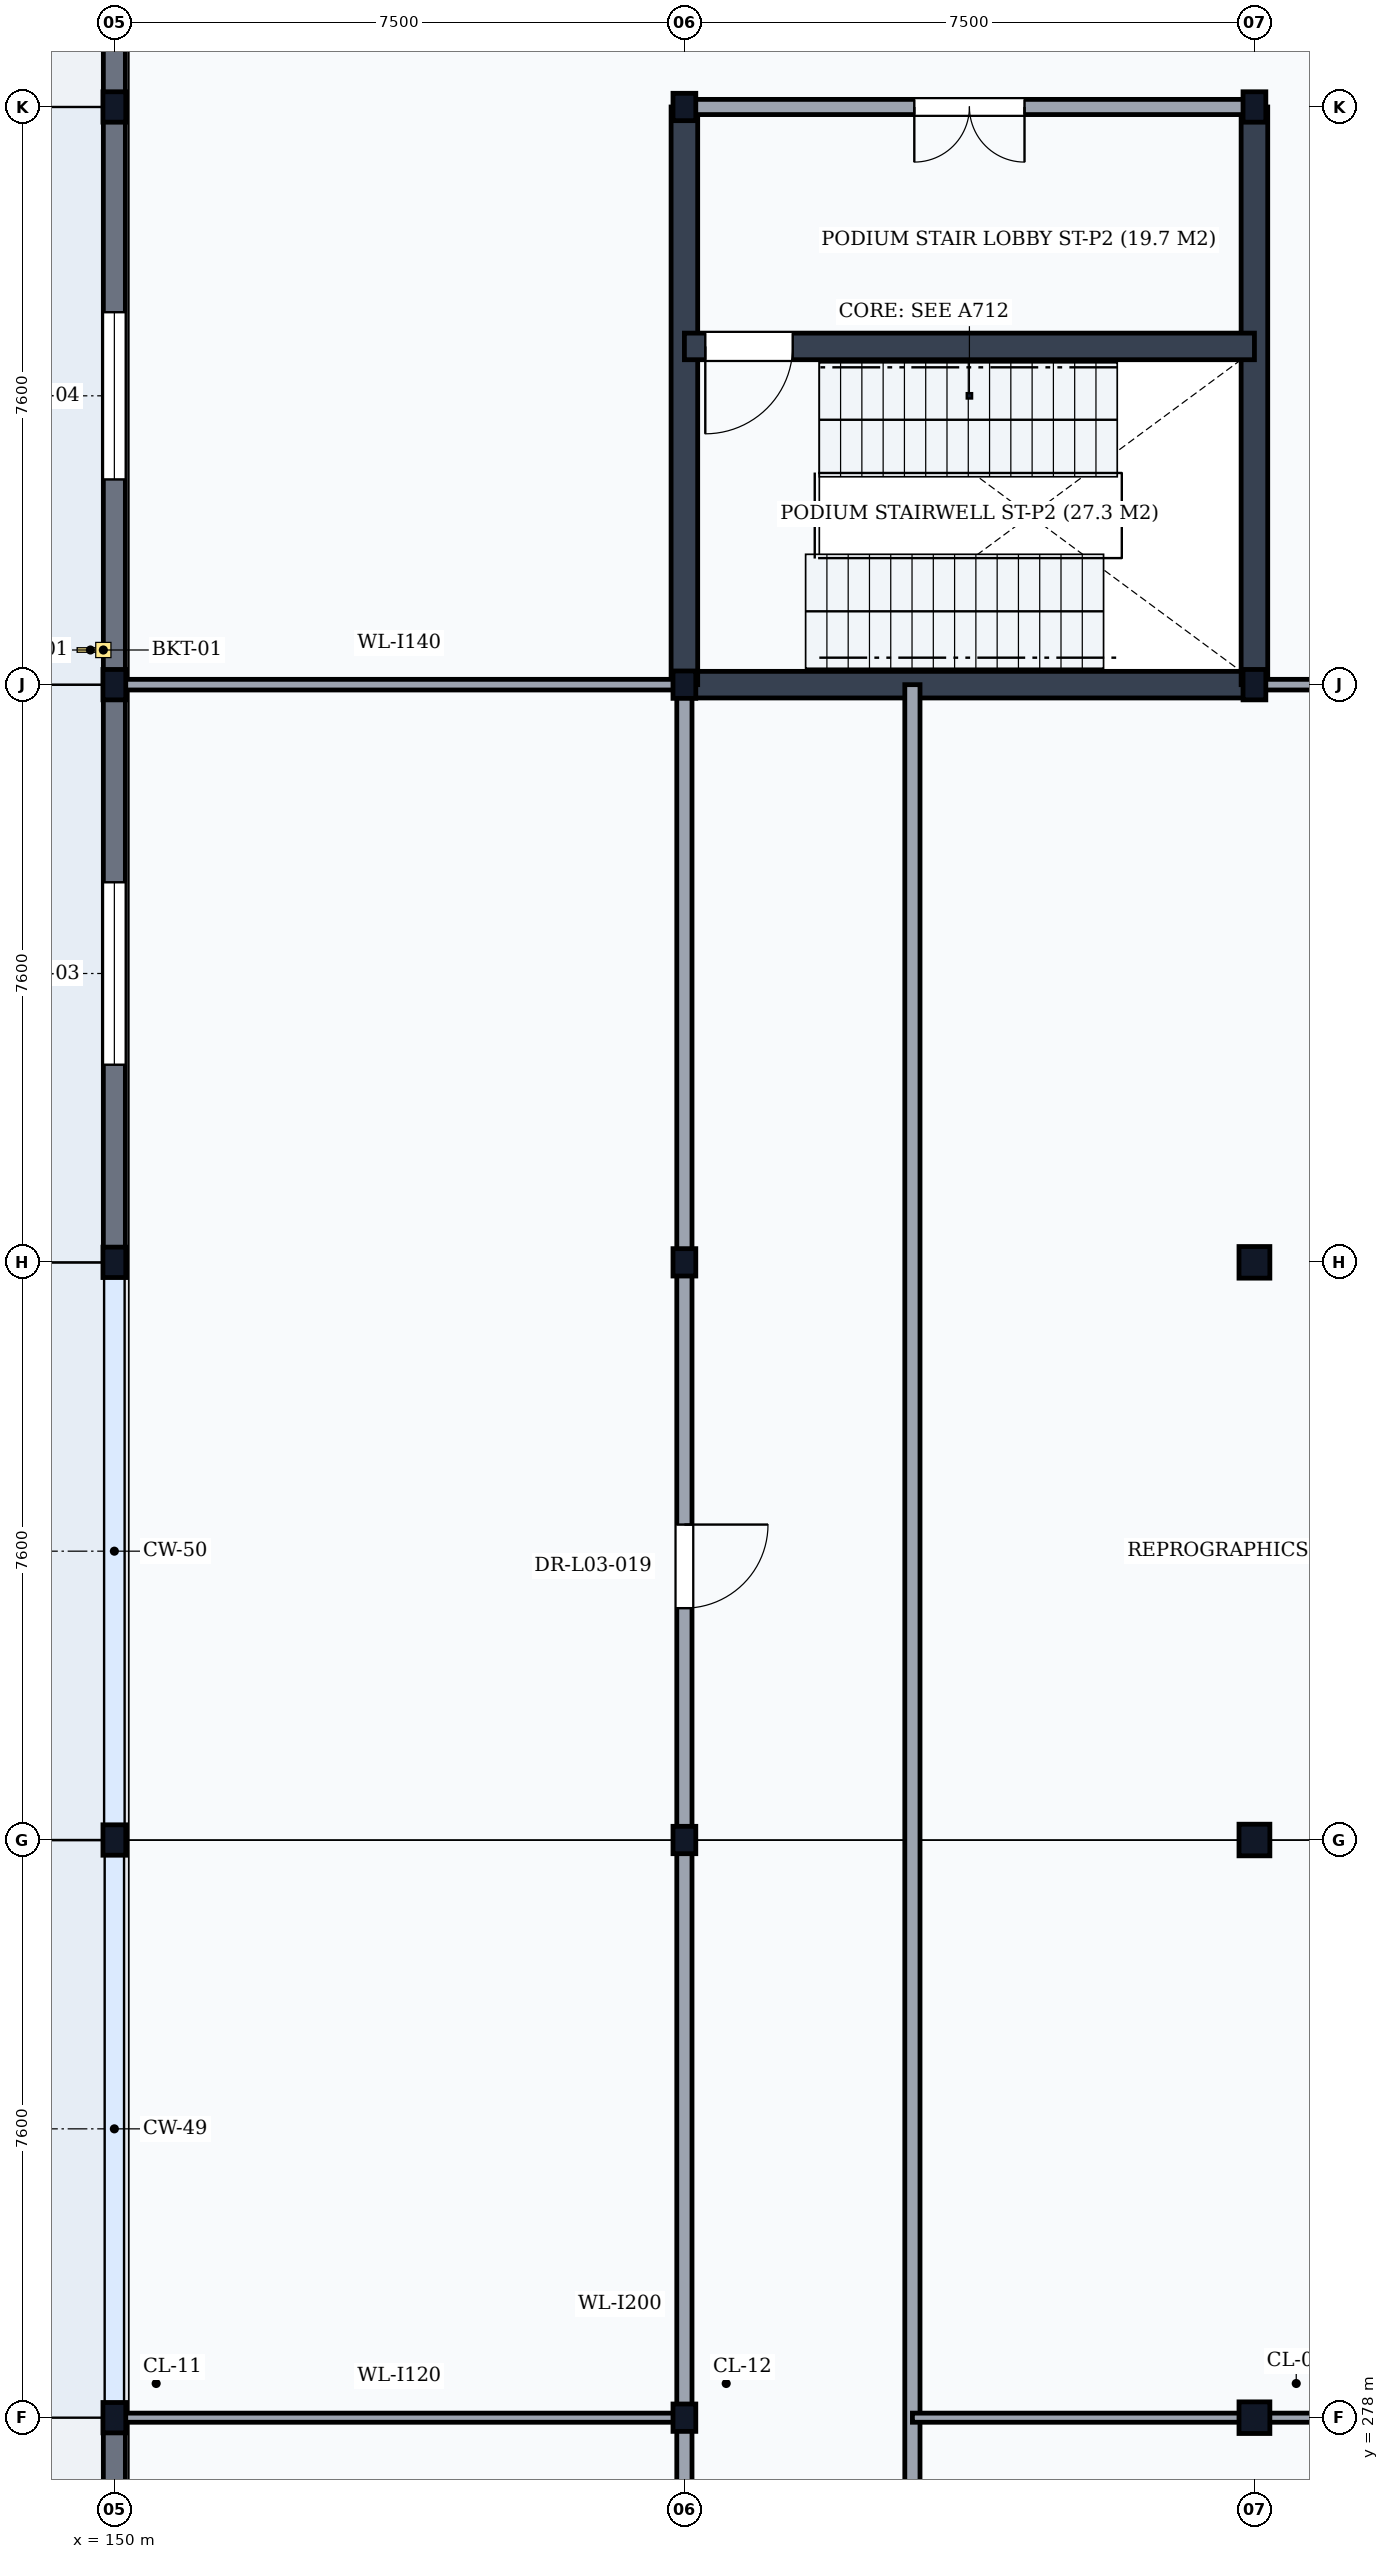
"""IFC4 building model, lengths in metres.
Left out: names, types, materials, properties, quantities, classifications, styles, units other than length and angle.
Written with IfcOpenShell. Run it as: python <this file> out.ifc"""

import sys

from ifc_helpers import new_model, si_unit, direction, frame, frame_2d, origin, origin_2d, place, context, subcontext, project, spatial, rectangle, i_section, extrude, element, fill, save


model = new_model("IFC4")
c1 = context("Model", 3, precision=1e-05, world=origin(), true_north=direction((0.0, 1.0)))
c2 = subcontext(c1, "Body", "Model", "MODEL_VIEW")
j1 = project(units=[si_unit("LENGTHUNIT", "METRE"), si_unit("PLANEANGLEUNIT", "RADIAN")], contexts=[c1])
p1 = place(None, origin())
s1 = spatial("IfcSite", under=j1, at=p1, CompositionType="ELEMENT")
p2 = place(p1, origin())
s2 = spatial("IfcBuilding", under=s1, at=p2, CompositionType="ELEMENT")
p3 = place(p2, frame((0.0, 0.0, 10.5)))
s3 = spatial("IfcBuildingStorey", under=s2, at=p3, CompositionType="ELEMENT", Elevation=10.5)
for number, where, z_axis, x_axis in (
    (1, (150.0, 278.0, 0.0), (0.0, 0.0, 1.0), (1.0, 0.0, 0.0)),
    (2, (150.0, 285.6, 0.0), (0.0, 0.0, 1.0), (1.0, 0.0, 0.0)),
    (3, (150.0, 293.2, 0.0), (0.0, 0.0, 1.0), (1.0, 0.0, 0.0)),
    (4, (150.0, 300.8, 0.0), (0.0, 0.0, 1.0), (1.0, 0.0, 0.0)),
    (5, (150.0, 308.4, 0.0), (0.0, 0.0, 1.0), (1.0, 0.0, 0.0)),
):
    element("IfcColumn", number, at=place(p3, frame(where, z_axis=z_axis, x_axis=x_axis)), inside=s3, PredefinedType="COLUMN", context=c2, shape_type="SweptSolid", body=[
        extrude(i_section(OverallWidth=0.3, OverallDepth=0.4, WebThickness=0.013, FlangeThickness=0.024, FilletRadius=0.027, at=origin_2d()), origin(), (0.0, 0.0, 1.0), 5.1),
    ])
for number, where, z_axis, x_axis in (
    (6, (157.5, 278.0, 0.0), (0.0, 0.0, 1.0), (1.0, 0.0, 0.0)),
    (7, (157.5, 285.6, 0.0), (0.0, 0.0, 1.0), (1.0, 0.0, 0.0)),
    (8, (157.5, 293.2, 0.0), (0.0, 0.0, 1.0), (1.0, 0.0, 0.0)),
    (9, (157.5, 300.8, 0.0), (0.0, 0.0, 1.0), (1.0, 0.0, 0.0)),
    (10, (157.5, 308.4, 0.0), (0.0, 0.0, 1.0), (1.0, 0.0, 0.0)),
):
    element("IfcColumn", number, at=place(p3, frame(where, z_axis=z_axis, x_axis=x_axis)), inside=s3, PredefinedType="COLUMN", context=c2, shape_type="SweptSolid", body=[
        extrude(i_section(OverallWidth=0.3, OverallDepth=0.36, WebThickness=0.012, FlangeThickness=0.022, FilletRadius=0.027, at=origin_2d()), origin(), (0.0, 0.0, 1.0), 5.1),
    ])
for number, where, z_axis, x_axis in (
    (11, (165.0, 278.0, 0.0), (0.0, 0.0, 1.0), (1.0, 0.0, 0.0)),
    (12, (165.0, 285.6, 0.0), (0.0, 0.0, 1.0), (1.0, 0.0, 0.0)),
    (13, (165.0, 293.2, 0.0), (0.0, 0.0, 1.0), (1.0, 0.0, 0.0)),
):
    element("IfcColumn", number, at=place(p3, frame(where, z_axis=z_axis, x_axis=x_axis)), inside=s3, PredefinedType="COLUMN", context=c2, shape_type="SweptSolid", body=[
        extrude(i_section(OverallWidth=0.406, OverallDepth=0.416, WebThickness=0.03, FlangeThickness=0.048, FilletRadius=0.015, at=origin_2d()), origin(), (0.0, 0.0, 1.0), 5.1),
    ])
for number, where, z_axis, x_axis in (
    (14, (165.0, 300.8, 0.0), (0.0, 0.0, 1.0), (1.0, 0.0, 0.0)),
    (15, (165.0, 308.4, 0.0), (0.0, 0.0, 1.0), (1.0, 0.0, 0.0)),
):
    element("IfcColumn", number, at=place(p3, frame(where, z_axis=z_axis, x_axis=x_axis)), inside=s3, PredefinedType="COLUMN", context=c2, shape_type="SweptSolid", body=[
        extrude(i_section(OverallWidth=0.3, OverallDepth=0.4, WebThickness=0.013, FlangeThickness=0.024, FilletRadius=0.027, at=origin_2d()), origin(), (0.0, 0.0, 1.0), 5.1),
    ])
p4 = place(p3, frame((150.0, 270.406, 0.0), z_axis=(0.0, 0.0, 1.0), x_axis=(0.0, 1.0, 0.0)))
e16 = element("IfcWall", 16, at=p4, inside=s3, PredefinedType="SOLIDWALL", context=c2, shape_type="SweptSolid", body=[
    extrude(rectangle(XDim=7.588, YDim=0.29, at=frame_2d((3.794, 0.0))), origin(), (0.0, 0.0, 1.0), 4.578),
])
p5 = place(p4, frame((3.094, 0.0, 0.95)))
e17 = element("IfcOpeningElement", 17, at=p5, cuts=e16, PredefinedType="OPENING", context=c2, shape_type="SweptSolid", body=[
    extrude(rectangle(XDim=1.4, YDim=2.4, at=frame_2d((0.7, 1.2))), frame((0.0, 0.16, 0.0), z_axis=(0.0, -1.0, 0.0), x_axis=(1.0, 0.0, 0.0)), (0.0, 0.0, 1.0), 0.32),
])
p6 = place(p3, frame((150.0, 293.206, 0.0), z_axis=(0.0, 0.0, 1.0), x_axis=(0.0, 1.0, 0.0)))
e18 = element("IfcWall", 18, at=p6, inside=s3, PredefinedType="SOLIDWALL", context=c2, shape_type="SweptSolid", body=[
    extrude(rectangle(XDim=7.588, YDim=0.29, at=frame_2d((3.794, 0.0))), origin(), (0.0, 0.0, 1.0), 4.578),
])
p7 = place(p6, frame((2.594, 0.0, 0.95)))
e19 = element("IfcOpeningElement", 19, at=p7, cuts=e18, PredefinedType="OPENING", context=c2, shape_type="SweptSolid", body=[
    extrude(rectangle(XDim=2.4, YDim=2.8, at=frame_2d((1.2, 1.4))), frame((0.0, 0.16, 0.0), z_axis=(0.0, -1.0, 0.0), x_axis=(1.0, 0.0, 0.0)), (0.0, 0.0, 1.0), 0.32),
])
p8 = place(p3, frame((150.0, 300.806, 0.0), z_axis=(0.0, 0.0, 1.0), x_axis=(0.0, 1.0, 0.0)))
e20 = element("IfcWall", 20, at=p8, inside=s3, PredefinedType="SOLIDWALL", context=c2, shape_type="SweptSolid", body=[
    extrude(rectangle(XDim=7.588, YDim=0.29, at=frame_2d((3.794, 0.0))), origin(), (0.0, 0.0, 1.0), 4.578),
])
p9 = place(p8, frame((2.694, 0.0, 0.95)))
e21 = element("IfcOpeningElement", 21, at=p9, cuts=e20, PredefinedType="OPENING", context=c2, shape_type="SweptSolid", body=[
    extrude(rectangle(XDim=2.2, YDim=2.8, at=frame_2d((1.1, 1.4))), frame((0.0, 0.16, 0.0), z_axis=(0.0, -1.0, 0.0), x_axis=(1.0, 0.0, 0.0)), (0.0, 0.0, 1.0), 0.32),
])
p10 = place(p3, frame((150.0, 308.406, 0.0), z_axis=(0.0, 0.0, 1.0), x_axis=(0.0, 1.0, 0.0)))
e22 = element("IfcWall", 22, at=p10, inside=s3, PredefinedType="SOLIDWALL", context=c2, shape_type="SweptSolid", body=[
    extrude(rectangle(XDim=7.588, YDim=0.29, at=frame_2d((3.794, 0.0))), origin(), (0.0, 0.0, 1.0), 4.578),
])
p11 = place(p10, frame((2.794, 0.0, 0.95)))
e23 = element("IfcOpeningElement", 23, at=p11, cuts=e22, PredefinedType="OPENING", context=c2, shape_type="SweptSolid", body=[
    extrude(rectangle(XDim=2.0, YDim=2.6, at=frame_2d((1.0, 1.3))), frame((0.0, 0.16, 0.0), z_axis=(0.0, -1.0, 0.0), x_axis=(1.0, 0.0, 0.0)), (0.0, 0.0, 1.0), 0.32),
])
p12 = place(p3, frame((150.1, 248.6, 5.1), z_axis=(0.0, 0.0, 1.0), x_axis=(0.0, 1.0, 0.0)))
e24 = element("IfcWall", 24, at=p12, inside=s3, PredefinedType="PARAPET", context=c2, shape_type="SweptSolid", body=[
    extrude(rectangle(XDim=74.8, YDim=0.18, at=frame_2d((37.4, 0.0))), origin(), (0.0, 0.0, 1.0), 1.2),
])
p13 = place(p3, frame((157.5, 300.8, 0.0), z_axis=(0.0, 0.0, 1.0), x_axis=(1.0, 0.0, 0.0)))
e25 = element("IfcWall", 25, at=p13, inside=s3, PredefinedType="SHEAR", context=c2, shape_type="SweptSolid", body=[
    extrude(rectangle(XDim=7.5, YDim=0.35, at=frame_2d((3.75, 0.0))), origin(), (0.0, 0.0, 1.0), 4.84),
])
for number, where, z_axis, x_axis in (
    (26, (157.5, 300.8, 0.0), (0.0, 0.0, 1.0), (0.0, 1.0, 0.0)),
    (27, (165.0, 300.8, 0.0), (0.0, 0.0, 1.0), (0.0, 1.0, 0.0)),
):
    element("IfcWall", number, at=place(p3, frame(where, z_axis=z_axis, x_axis=x_axis)), inside=s3, PredefinedType="SHEAR", context=c2, shape_type="SweptSolid", body=[
        extrude(rectangle(XDim=7.6, YDim=0.35, at=frame_2d((3.8, 0.0))), origin(), (0.0, 0.0, 1.0), 4.84),
    ])
p14 = place(p3, frame((157.5, 305.25, 0.0), z_axis=(0.0, 0.0, 1.0), x_axis=(1.0, 0.0, 0.0)))
e28 = element("IfcWall", 28, at=p14, inside=s3, PredefinedType="SHEAR", context=c2, shape_type="SweptSolid", body=[
    extrude(rectangle(XDim=7.5, YDim=0.35, at=frame_2d((3.75, 0.0))), origin(), (0.0, 0.0, 1.0), 4.84),
])
p15 = place(p14, frame((0.275, 0.0, 0.0)))
e29 = element("IfcOpeningElement", 29, at=p15, cuts=e28, PredefinedType="OPENING", context=c2, shape_type="SweptSolid", body=[
    extrude(rectangle(XDim=1.15, YDim=2.15, at=frame_2d((0.575, 1.075))), frame((0.0, 0.19, 0.0), z_axis=(0.0, -1.0, 0.0), x_axis=(1.0, 0.0, 0.0)), (0.0, 0.0, 1.0), 0.38),
])
p16 = place(p3, frame((157.5, 308.4, 0.0), z_axis=(0.0, 0.0, 1.0), x_axis=(1.0, 0.0, 0.0)))
e30 = element("IfcWall", 30, at=p16, inside=s3, PredefinedType="PARTITIONING", context=c2, shape_type="SweptSolid", body=[
    extrude(rectangle(XDim=7.5, YDim=0.2, at=frame_2d((3.75, 0.0))), origin(), (0.0, 0.0, 1.0), 4.478),
])
p17 = place(p16, frame((3.025, 0.0, 0.0)))
e31 = element("IfcOpeningElement", 31, at=p17, cuts=e30, PredefinedType="OPENING", context=c2, shape_type="SweptSolid", body=[
    extrude(rectangle(XDim=1.45, YDim=2.2, at=frame_2d((0.725, 1.1))), frame((0.0, 0.115, 0.0), z_axis=(0.0, -1.0, 0.0), x_axis=(1.0, 0.0, 0.0)), (0.0, 0.0, 1.0), 0.23),
])
p18 = place(p3, frame((157.5, 258.2, 0.0), z_axis=(0.0, 0.0, 1.0), x_axis=(0.0, 1.0, 0.0)))
e32 = element("IfcWall", 32, at=p18, inside=s3, PredefinedType="PARTITIONING", context=c2, shape_type="SweptSolid", body=[
    extrude(rectangle(XDim=42.6, YDim=0.2, at=frame_2d((21.3, 0.0))), origin(), (0.0, 0.0, 1.0), 4.478),
])
p19 = place(p18, frame((30.45, 0.0, 0.0)))
e33 = element("IfcOpeningElement", 33, at=p19, cuts=e32, PredefinedType="OPENING", context=c2, shape_type="SweptSolid", body=[
    extrude(rectangle(XDim=1.1, YDim=2.1, at=frame_2d((0.55, 1.05))), frame((0.0, 0.115, 0.0), z_axis=(0.0, -1.0, 0.0), x_axis=(1.0, 0.0, 0.0)), (0.0, 0.0, 1.0), 0.23),
])
p20 = place(p3, frame((150.0, 278.0, 0.0), z_axis=(0.0, 0.0, 1.0), x_axis=(1.0, 0.0, 0.0)))
e34 = element("IfcWall", 34, at=p20, inside=s3, PredefinedType="PARTITIONING", context=c2, shape_type="SweptSolid", body=[
    extrude(rectangle(XDim=7.5, YDim=0.12, at=frame_2d((3.75, 0.0))), origin(), (0.0, 0.0, 1.0), 4.478),
])
p21 = place(p3, frame((160.5, 258.2, 0.0), z_axis=(0.0, 0.0, 1.0), x_axis=(0.0, 1.0, 0.0)))
e35 = element("IfcWall", 35, at=p21, inside=s3, PredefinedType="PARTITIONING", context=c2, shape_type="SweptSolid", body=[
    extrude(rectangle(XDim=42.6, YDim=0.2, at=frame_2d((21.3, 0.0))), origin(), (0.0, 0.0, 1.0), 4.84),
])
p22 = place(p21, frame((10.56, 0.0, 0.0)))
e36 = element("IfcOpeningElement", 36, at=p22, cuts=e35, PredefinedType="OPENING", context=c2, shape_type="SweptSolid", body=[
    extrude(rectangle(XDim=1.1, YDim=2.1, at=frame_2d((0.55, 1.05))), frame((0.0, 0.115, 0.0), z_axis=(0.0, -1.0, 0.0), x_axis=(1.0, 0.0, 0.0)), (0.0, 0.0, 1.0), 0.23),
])
p23 = place(p3, frame((160.5, 278.0, 0.0), z_axis=(0.0, 0.0, 1.0), x_axis=(1.0, 0.0, 0.0)))
e37 = element("IfcWall", 37, at=p23, inside=s3, PredefinedType="PARTITIONING", context=c2, shape_type="SweptSolid", body=[
    extrude(rectangle(XDim=28.5, YDim=0.12, at=frame_2d((14.25, 0.0))), origin(), (0.0, 0.0, 1.0), 4.338),
])
p24 = place(p3, frame((150.0, 300.8, 0.0), z_axis=(0.0, 0.0, 1.0), x_axis=(1.0, 0.0, 0.0)))
e38 = element("IfcWall", 38, at=p24, inside=s3, PredefinedType="PARTITIONING", context=c2, shape_type="SweptSolid", body=[
    extrude(rectangle(XDim=7.5, YDim=0.14, at=frame_2d((3.75, 0.0))), origin(), (0.0, 0.0, 1.0), 4.478),
])
p25 = place(p3, frame((165.0, 300.8, 0.0), z_axis=(0.0, 0.0, 1.0), x_axis=(1.0, 0.0, 0.0)))
e39 = element("IfcWall", 39, at=p25, inside=s3, PredefinedType="PARTITIONING", context=c2, shape_type="SweptSolid", body=[
    extrude(rectangle(XDim=32.0, YDim=0.14, at=frame_2d((16.0, 0.0))), origin(), (0.0, 0.0, 1.0), 4.388),
])
p26 = place(p7, origin())
e40 = element("IfcWindow", 40, at=p26, inside=s3, PartitioningType="DOUBLE_PANEL_VERTICAL", PredefinedType="WINDOW", context=c2, shape_type="SweptSolid", body=[
    extrude(rectangle(XDim=2.4, YDim=2.8, at=frame_2d((1.2, 1.4))), frame((0.0, 0.03, 0.0), z_axis=(0.0, -1.0, 0.0), x_axis=(1.0, 0.0, 0.0)), (0.0, 0.0, 1.0), 0.06),
])
fill(e19, e40)
p27 = place(p9, origin())
e41 = element("IfcWindow", 41, at=p27, inside=s3, PartitioningType="DOUBLE_PANEL_VERTICAL", PredefinedType="WINDOW", context=c2, shape_type="SweptSolid", body=[
    extrude(rectangle(XDim=2.2, YDim=2.8, at=frame_2d((1.1, 1.4))), frame((0.0, 0.03, 0.0), z_axis=(0.0, -1.0, 0.0), x_axis=(1.0, 0.0, 0.0)), (0.0, 0.0, 1.0), 0.06),
])
fill(e21, e41)
p28 = place(p15, frame((1.15, 0.0, 0.0), z_axis=(0.0, 0.0, 1.0), x_axis=(-1.0, 0.0, 0.0)))
e42 = element("IfcDoor", 42, at=p28, inside=s3, OperationType="SINGLE_SWING_RIGHT", PredefinedType="DOOR", context=c2, shape_type="SweptSolid", body=[
    extrude(rectangle(XDim=1.15, YDim=2.15, at=frame_2d((0.575, 1.075))), frame((0.0, 0.025, 0.0), z_axis=(0.0, -1.0, 0.0), x_axis=(1.0, 0.0, 0.0)), (0.0, 0.0, 1.0), 0.05),
])
fill(e29, e42)
p29 = place(p17, frame((1.45, 0.0, 0.0), z_axis=(0.0, 0.0, 1.0), x_axis=(-1.0, 0.0, 0.0)))
e43 = element("IfcDoor", 43, at=p29, inside=s3, OperationType="DOUBLE_DOOR_SINGLE_SWING", PredefinedType="DOOR", context=c2, shape_type="SweptSolid", body=[
    extrude(rectangle(XDim=1.45, YDim=2.2, at=frame_2d((0.725, 1.1))), frame((0.0, 0.025, 0.0), z_axis=(0.0, -1.0, 0.0), x_axis=(1.0, 0.0, 0.0)), (0.0, 0.0, 1.0), 0.05),
])
fill(e31, e43)
p30 = place(p19, origin())
e44 = element("IfcDoor", 44, at=p30, inside=s3, OperationType="SINGLE_SWING_RIGHT", PredefinedType="DOOR", context=c2, shape_type="SweptSolid", body=[
    extrude(rectangle(XDim=1.1, YDim=2.1, at=frame_2d((0.55, 1.05))), frame((0.0, 0.025, 0.0), z_axis=(0.0, -1.0, 0.0), x_axis=(1.0, 0.0, 0.0)), (0.0, 0.0, 1.0), 0.05),
])
fill(e33, e44)
save(model, sys.argv[1])
